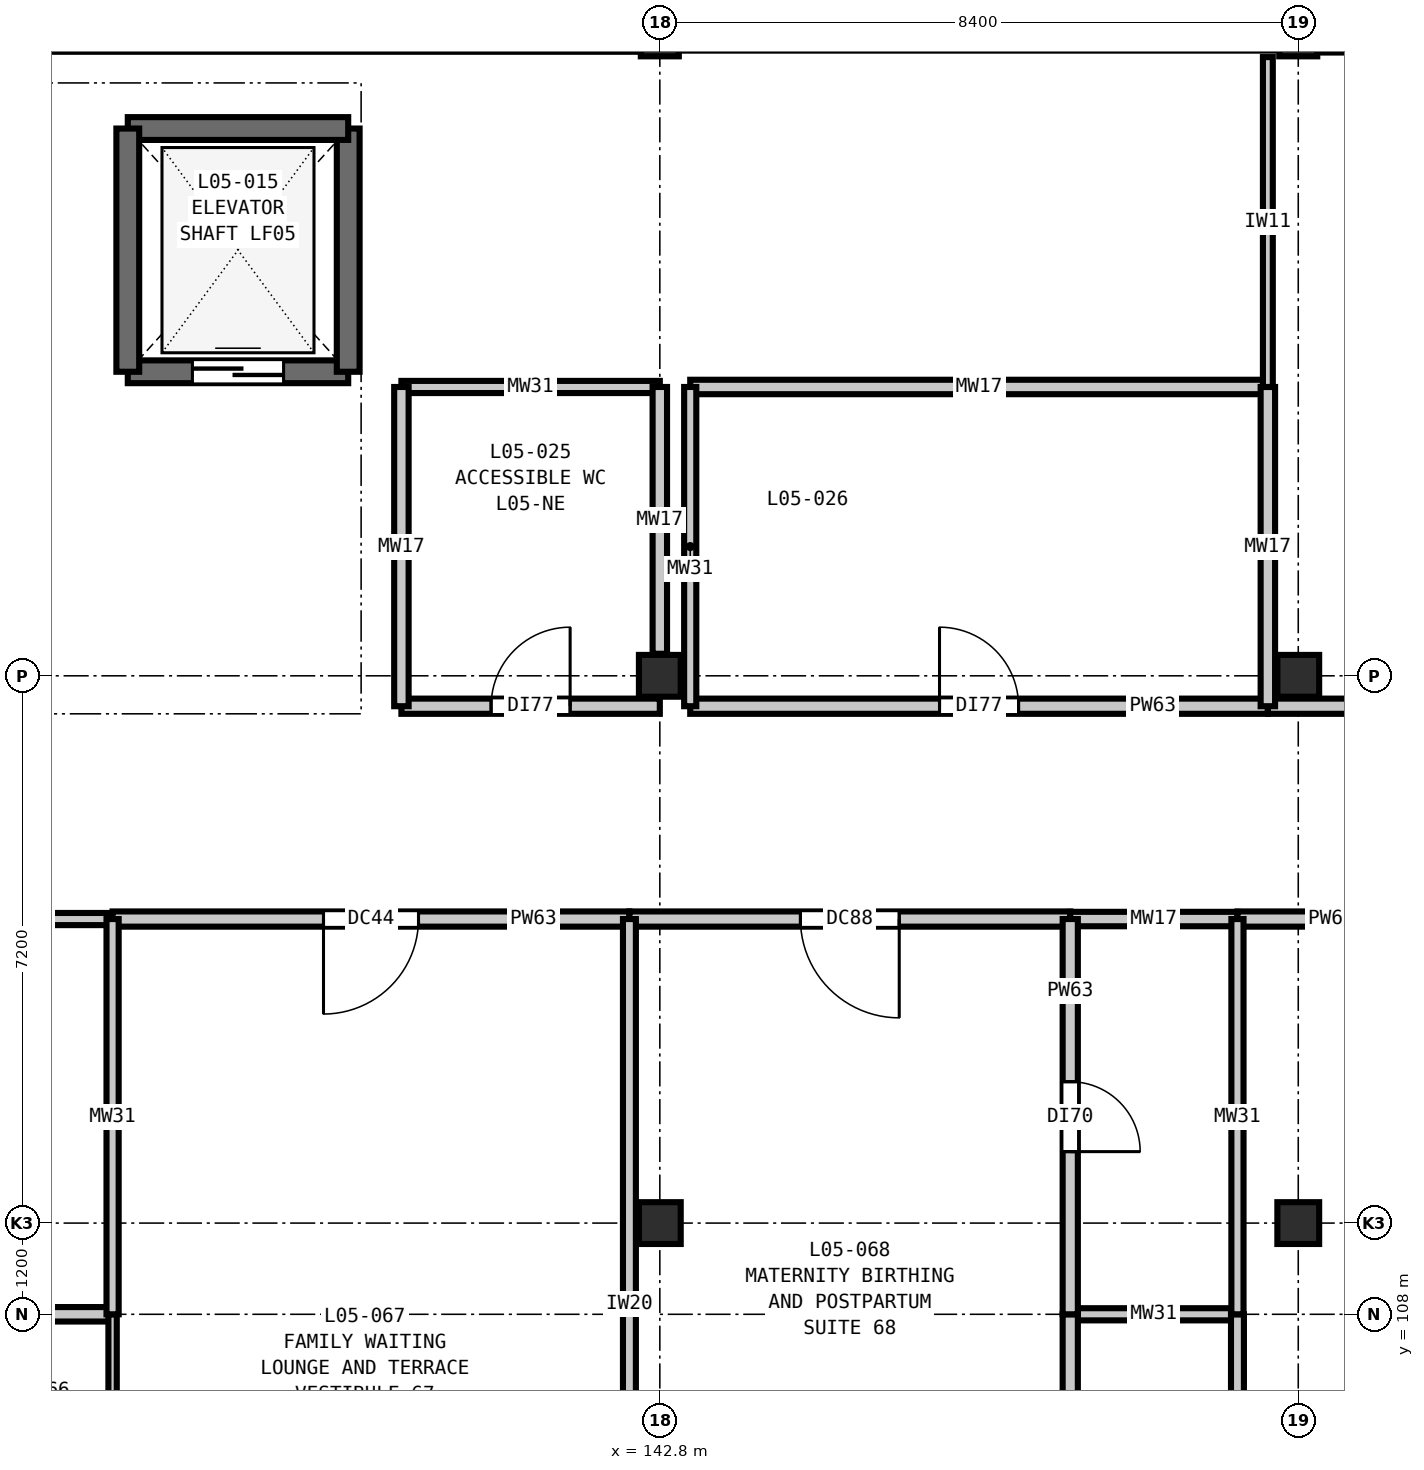
"""IFC4 building model, lengths in metres.
Left out: names, types, materials, properties, quantities, classifications, styles, units other than length and angle.
Written with IfcOpenShell. Run it as: python <this file> out.ifc"""

import sys

from ifc_helpers import new_model, si_unit, direction, frame, frame_2d, origin, origin_2d, place, context, subcontext, project, spatial, rectangle, extrude, element, fill, save


model = new_model("IFC4")
c1 = context("Model", 3, precision=1e-05, world=origin(), true_north=direction((0.0, 1.0)))
c2 = subcontext(c1, "Body", "Model", "MODEL_VIEW")
j1 = project(units=[si_unit("LENGTHUNIT", "METRE"), si_unit("PLANEANGLEUNIT", "RADIAN")], contexts=[c1])
p1 = place(None, origin())
s1 = spatial("IfcSite", under=j1, at=p1, CompositionType="ELEMENT")
p2 = place(p1, origin())
s2 = spatial("IfcBuilding", under=s1, at=p2, CompositionType="ELEMENT")
p3 = place(p2, frame((0.0, 0.0, 24.6)))
s3 = spatial("IfcBuildingStorey", under=s2, at=p3, CompositionType="ELEMENT", Elevation=24.6)
for number, where, z_axis, x_axis in (
    (1, (142.8, 109.2, 0.0), (0.0, 0.0, 1.0), (1.0, 0.0, 0.0)),
    (2, (142.8, 116.4, 0.0), (0.0, 0.0, 1.0), (1.0, 0.0, 0.0)),
):
    element("IfcColumn", number, at=place(p3, frame(where, z_axis=z_axis, x_axis=x_axis)), inside=s3, PredefinedType="COLUMN", context=c2, shape_type="SweptSolid", body=[
        extrude(rectangle(XDim=0.55, YDim=0.55, at=origin_2d()), origin(), (0.0, 0.0, 1.0), 4.2),
    ])
p4 = place(p3, frame((142.8, 124.8, 0.0), z_axis=(0.0, 0.0, 1.0), x_axis=(1.0, 0.0, 0.0)))
e3 = element("IfcColumn", 3, at=p4, inside=s3, PredefinedType="COLUMN", context=c2, shape_type="SweptSolid", body=[
    extrude(rectangle(XDim=0.5, YDim=0.5, at=origin_2d()), origin(), (0.0, 0.0, 1.0), 4.2),
])
for number, where, z_axis, x_axis in (
    (4, (151.2, 109.2, 0.0), (0.0, 0.0, 1.0), (1.0, 0.0, 0.0)),
    (5, (151.2, 116.4, 0.0), (0.0, 0.0, 1.0), (1.0, 0.0, 0.0)),
):
    element("IfcColumn", number, at=place(p3, frame(where, z_axis=z_axis, x_axis=x_axis)), inside=s3, PredefinedType="COLUMN", context=c2, shape_type="SweptSolid", body=[
        extrude(rectangle(XDim=0.55, YDim=0.55, at=origin_2d()), origin(), (0.0, 0.0, 1.0), 4.2),
    ])
p5 = place(p3, frame((151.2, 124.8, 0.0), z_axis=(0.0, 0.0, 1.0), x_axis=(1.0, 0.0, 0.0)))
e6 = element("IfcColumn", 6, at=p5, inside=s3, PredefinedType="COLUMN", context=c2, shape_type="SweptSolid", body=[
    extrude(rectangle(XDim=0.5, YDim=0.5, at=origin_2d()), origin(), (0.0, 0.0, 1.0), 4.2),
])
p6 = place(p3, frame((135.8, 120.4, 0.0), z_axis=(0.0, 0.0, 1.0), x_axis=(1.0, 0.0, 0.0)))
e7 = element("IfcWall", 7, at=p6, inside=s3, PredefinedType="SHEAR", context=c2, shape_type="SweptSolid", body=[
    extrude(rectangle(XDim=2.9, YDim=0.3, at=frame_2d((1.45, 0.0))), origin(), (0.0, 0.0, 1.0), 4.2),
])
p7 = place(p6, frame((0.85, 0.0, 0.0)))
e8 = element("IfcOpeningElement", 8, at=p7, cuts=e7, PredefinedType="OPENING", context=c2, shape_type="SweptSolid", body=[
    extrude(rectangle(XDim=1.2, YDim=2.2, at=frame_2d((0.6, 1.1))), frame((0.0, 0.16, 0.0), z_axis=(0.0, -1.0, 0.0), x_axis=(1.0, 0.0, 0.0)), (0.0, 0.0, 1.0), 0.32),
])
p8 = place(p3, frame((138.7, 120.4, 0.0), z_axis=(0.0, 0.0, 1.0), x_axis=(0.0, 1.0, 0.0)))
e9 = element("IfcWall", 9, at=p8, inside=s3, PredefinedType="SHEAR", context=c2, shape_type="SweptSolid", body=[
    extrude(rectangle(XDim=3.2, YDim=0.3, at=frame_2d((1.6, 0.0))), origin(), (0.0, 0.0, 1.0), 4.2),
])
p9 = place(p3, frame((138.7, 123.6, 0.0), z_axis=(0.0, 0.0, 1.0), x_axis=(-1.0, 0.0, 0.0)))
e10 = element("IfcWall", 10, at=p9, inside=s3, PredefinedType="SHEAR", context=c2, shape_type="SweptSolid", body=[
    extrude(rectangle(XDim=2.9, YDim=0.3, at=frame_2d((1.45, 0.0))), origin(), (0.0, 0.0, 1.0), 4.2),
])
p10 = place(p3, frame((135.8, 123.6, 0.0), z_axis=(0.0, 0.0, 1.0), x_axis=(0.0, -1.0, 0.0)))
e11 = element("IfcWall", 11, at=p10, inside=s3, PredefinedType="SHEAR", context=c2, shape_type="SweptSolid", body=[
    extrude(rectangle(XDim=3.2, YDim=0.3, at=frame_2d((1.6, 0.0))), origin(), (0.0, 0.0, 1.0), 4.2),
])
p11 = place(p3, frame((133.4, 108.0, 0.0), z_axis=(0.0, 0.0, 1.0), x_axis=(1.0, 0.0, 0.0)))
e12 = element("IfcWall", 12, at=p11, inside=s3, PredefinedType="PLUMBINGWALL", context=c2, shape_type="SweptSolid", body=[
    extrude(rectangle(XDim=2.2, YDim=0.19, at=frame_2d((1.1, 0.0))), origin(), (0.0, 0.0, 1.0), 3.92),
])
p12 = place(p3, frame((148.2, 108.0, 0.0), z_axis=(0.0, 0.0, 1.0), x_axis=(1.0, 0.0, 0.0)))
e13 = element("IfcWall", 13, at=p12, inside=s3, PredefinedType="PLUMBINGWALL", context=c2, shape_type="SweptSolid", body=[
    extrude(rectangle(XDim=2.2, YDim=0.16, at=frame_2d((1.1, 0.0))), origin(), (0.0, 0.0, 1.0), 3.92),
])
p13 = place(p3, frame((133.4, 113.2, 0.0), z_axis=(0.0, 0.0, 1.0), x_axis=(1.0, 0.0, 0.0)))
e14 = element("IfcWall", 14, at=p13, inside=s3, PredefinedType="PLUMBINGWALL", context=c2, shape_type="SweptSolid", body=[
    extrude(rectangle(XDim=2.2, YDim=0.16, at=frame_2d((1.1, 0.0))), origin(), (0.0, 0.0, 1.0), 3.92),
])
p14 = place(p3, frame((135.6, 113.2, 0.0), z_axis=(0.0, 0.0, 1.0), x_axis=(1.0, 0.0, 0.0)))
e15 = element("IfcWall", 15, at=p14, inside=s3, PredefinedType="PARTITIONING", context=c2, shape_type="SweptSolid", body=[
    extrude(rectangle(XDim=6.8, YDim=0.2, at=frame_2d((3.4, 0.0))), origin(), (0.0, 0.0, 1.0), 3.92),
])
p15 = place(p14, frame((2.775, 0.0, 0.0)))
e16 = element("IfcOpeningElement", 16, at=p15, cuts=e15, PredefinedType="OPENING", context=c2, shape_type="SweptSolid", body=[
    extrude(rectangle(XDim=1.25, YDim=2.15, at=frame_2d((0.625, 1.075))), frame((0.0, 0.11, 0.0), z_axis=(0.0, -1.0, 0.0), x_axis=(1.0, 0.0, 0.0)), (0.0, 0.0, 1.0), 0.22),
])
p16 = place(p3, frame((142.4, 113.2, 0.0), z_axis=(0.0, 0.0, 1.0), x_axis=(1.0, 0.0, 0.0)))
e17 = element("IfcWall", 17, at=p16, inside=s3, PredefinedType="PARTITIONING", context=c2, shape_type="SweptSolid", body=[
    extrude(rectangle(XDim=5.8, YDim=0.2, at=frame_2d((2.9, 0.0))), origin(), (0.0, 0.0, 1.0), 3.92),
])
p17 = place(p16, frame((2.25, 0.0, 0.0)))
e18 = element("IfcOpeningElement", 18, at=p17, cuts=e17, PredefinedType="OPENING", context=c2, shape_type="SweptSolid", body=[
    extrude(rectangle(XDim=1.3, YDim=2.2, at=frame_2d((0.65, 1.1))), frame((0.0, 0.11, 0.0), z_axis=(0.0, -1.0, 0.0), x_axis=(1.0, 0.0, 0.0)), (0.0, 0.0, 1.0), 0.22),
])
p18 = place(p3, frame((148.2, 113.2, 0.0), z_axis=(0.0, 0.0, 1.0), x_axis=(1.0, 0.0, 0.0)))
e19 = element("IfcWall", 19, at=p18, inside=s3, PredefinedType="PLUMBINGWALL", context=c2, shape_type="SweptSolid", body=[
    extrude(rectangle(XDim=2.2, YDim=0.19, at=frame_2d((1.1, 0.0))), origin(), (0.0, 0.0, 1.0), 3.92),
])
p19 = place(p3, frame((150.4, 113.2, 0.0), z_axis=(0.0, 0.0, 1.0), x_axis=(1.0, 0.0, 0.0)))
e20 = element("IfcWall", 20, at=p19, inside=s3, PredefinedType="PARTITIONING", context=c2, shape_type="SweptSolid", body=[
    extrude(rectangle(XDim=6.8, YDim=0.2, at=frame_2d((3.4, 0.0))), origin(), (0.0, 0.0, 1.0), 3.92),
])
p20 = place(p19, frame((2.725, 0.0, 0.0)))
e21 = element("IfcOpeningElement", 21, at=p20, cuts=e20, PredefinedType="OPENING", context=c2, shape_type="SweptSolid", body=[
    extrude(rectangle(XDim=1.35, YDim=2.2, at=frame_2d((0.675, 1.1))), frame((0.0, 0.11, 0.0), z_axis=(0.0, -1.0, 0.0), x_axis=(1.0, 0.0, 0.0)), (0.0, 0.0, 1.0), 0.22),
])
p21 = place(p3, frame((139.4, 116.0, 0.0), z_axis=(0.0, 0.0, 1.0), x_axis=(1.0, 0.0, 0.0)))
e22 = element("IfcWall", 22, at=p21, inside=s3, PredefinedType="PARTITIONING", context=c2, shape_type="SweptSolid", body=[
    extrude(rectangle(XDim=3.4, YDim=0.2, at=frame_2d((1.7, 0.0))), origin(), (0.0, 0.0, 1.0), 3.92),
])
p22 = place(p21, frame((1.18, 0.0, 0.0)))
e23 = element("IfcOpeningElement", 23, at=p22, cuts=e22, PredefinedType="OPENING", context=c2, shape_type="SweptSolid", body=[
    extrude(rectangle(XDim=1.04, YDim=2.1, at=frame_2d((0.52, 1.05))), frame((0.0, 0.11, 0.0), z_axis=(0.0, -1.0, 0.0), x_axis=(1.0, 0.0, 0.0)), (0.0, 0.0, 1.0), 0.22),
])
p23 = place(p3, frame((143.2, 116.0, 0.0), z_axis=(0.0, 0.0, 1.0), x_axis=(1.0, 0.0, 0.0)))
e24 = element("IfcWall", 24, at=p23, inside=s3, PredefinedType="PARTITIONING", context=c2, shape_type="SweptSolid", body=[
    extrude(rectangle(XDim=7.6, YDim=0.2, at=frame_2d((3.8, 0.0))), origin(), (0.0, 0.0, 1.0), 3.92),
])
p24 = place(p23, frame((3.28, 0.0, 0.0)))
e25 = element("IfcOpeningElement", 25, at=p24, cuts=e24, PredefinedType="OPENING", context=c2, shape_type="SweptSolid", body=[
    extrude(rectangle(XDim=1.04, YDim=2.1, at=frame_2d((0.52, 1.05))), frame((0.0, 0.11, 0.0), z_axis=(0.0, -1.0, 0.0), x_axis=(1.0, 0.0, 0.0)), (0.0, 0.0, 1.0), 0.22),
])
p25 = place(p3, frame((150.8, 116.0, 0.0), z_axis=(0.0, 0.0, 1.0), x_axis=(1.0, 0.0, 0.0)))
e26 = element("IfcWall", 26, at=p25, inside=s3, PredefinedType="PARTITIONING", context=c2, shape_type="SweptSolid", body=[
    extrude(rectangle(XDim=6.8, YDim=0.2, at=frame_2d((3.4, 0.0))), origin(), (0.0, 0.0, 1.0), 3.92),
])
p26 = place(p25, frame((2.55, 0.0, 0.0)))
e27 = element("IfcOpeningElement", 27, at=p26, cuts=e26, PredefinedType="OPENING", context=c2, shape_type="SweptSolid", body=[
    extrude(rectangle(XDim=1.7, YDim=2.3, at=frame_2d((0.85, 1.15))), frame((0.0, 0.11, 0.0), z_axis=(0.0, -1.0, 0.0), x_axis=(1.0, 0.0, 0.0)), (0.0, 0.0, 1.0), 0.22),
])
p27 = place(p3, frame((139.4, 120.2, 0.0), z_axis=(0.0, 0.0, 1.0), x_axis=(1.0, 0.0, 0.0)))
e28 = element("IfcWall", 28, at=p27, inside=s3, PredefinedType="PLUMBINGWALL", context=c2, shape_type="SweptSolid", body=[
    extrude(rectangle(XDim=3.4, YDim=0.16, at=frame_2d((1.7, 0.0))), origin(), (0.0, 0.0, 1.0), 3.92),
])
p28 = place(p3, frame((143.2, 120.2, 0.0), z_axis=(0.0, 0.0, 1.0), x_axis=(1.0, 0.0, 0.0)))
e29 = element("IfcWall", 29, at=p28, inside=s3, PredefinedType="PLUMBINGWALL", context=c2, shape_type="SweptSolid", body=[
    extrude(rectangle(XDim=7.6, YDim=0.19, at=frame_2d((3.8, 0.0))), origin(), (0.0, 0.0, 1.0), 3.92),
])
p29 = place(p3, frame((135.6, 103.06, 0.0), z_axis=(0.0, 0.0, 1.0), x_axis=(0.0, 1.0, 0.0)))
e30 = element("IfcWall", 30, at=p29, inside=s3, PredefinedType="PARTITIONING", context=c2, shape_type="SweptSolid", body=[
    extrude(rectangle(XDim=4.94, YDim=0.11, at=frame_2d((2.47, 0.0))), origin(), (0.0, 0.0, 1.0), 3.92),
])
p30 = place(p3, frame((135.6, 108.0, 0.0), z_axis=(0.0, 0.0, 1.0), x_axis=(0.0, 1.0, 0.0)))
e31 = element("IfcWall", 31, at=p30, inside=s3, PredefinedType="PLUMBINGWALL", context=c2, shape_type="SweptSolid", body=[
    extrude(rectangle(XDim=5.2, YDim=0.16, at=frame_2d((2.6, 0.0))), origin(), (0.0, 0.0, 1.0), 3.92),
])
p31 = place(p3, frame((139.4, 116.0, 0.0), z_axis=(0.0, 0.0, 1.0), x_axis=(0.0, 1.0, 0.0)))
e32 = element("IfcWall", 32, at=p31, inside=s3, PredefinedType="PLUMBINGWALL", context=c2, shape_type="SweptSolid", body=[
    extrude(rectangle(XDim=4.2, YDim=0.19, at=frame_2d((2.1, 0.0))), origin(), (0.0, 0.0, 1.0), 3.92),
])
p32 = place(p3, frame((142.4, 103.06, 0.0), z_axis=(0.0, 0.0, 1.0), x_axis=(0.0, 1.0, 0.0)))
e33 = element("IfcWall", 33, at=p32, inside=s3, PredefinedType="PARTITIONING", context=c2, shape_type="SweptSolid", body=[
    extrude(rectangle(XDim=10.14, YDim=0.17, at=frame_2d((5.07, 0.0))), origin(), (0.0, 0.0, 1.0), 3.92),
])
p33 = place(p3, frame((142.8, 116.69, 0.0), z_axis=(0.0, 0.0, 1.0), x_axis=(0.0, 1.0, 0.0)))
e34 = element("IfcWall", 34, at=p33, inside=s3, PredefinedType="PLUMBINGWALL", context=c2, shape_type="SweptSolid", body=[
    extrude(rectangle(XDim=3.51, YDim=0.19, at=frame_2d((1.755, 0.0))), origin(), (0.0, 0.0, 1.0), 3.635),
])
p34 = place(p3, frame((143.2, 116.0, 0.0), z_axis=(0.0, 0.0, 1.0), x_axis=(0.0, 1.0, 0.0)))
e35 = element("IfcWall", 35, at=p34, inside=s3, PredefinedType="PLUMBINGWALL", context=c2, shape_type="SweptSolid", body=[
    extrude(rectangle(XDim=4.2, YDim=0.16, at=frame_2d((2.1, 0.0))), origin(), (0.0, 0.0, 1.0), 3.92),
])
p35 = place(p3, frame((148.2, 103.06, 0.0), z_axis=(0.0, 0.0, 1.0), x_axis=(0.0, 1.0, 0.0)))
e36 = element("IfcWall", 36, at=p35, inside=s3, PredefinedType="PARTITIONING", context=c2, shape_type="SweptSolid", body=[
    extrude(rectangle(XDim=4.94, YDim=0.2, at=frame_2d((2.47, 0.0))), origin(), (0.0, 0.0, 1.0), 3.92),
])
p36 = place(p35, frame((1.545, 0.0, 0.0)))
e37 = element("IfcOpeningElement", 37, at=p36, cuts=e36, PredefinedType="OPENING", context=c2, shape_type="SweptSolid", body=[
    extrude(rectangle(XDim=1.85, YDim=2.3, at=frame_2d((0.925, 1.15))), frame((0.0, 0.11, 0.0), z_axis=(0.0, -1.0, 0.0), x_axis=(1.0, 0.0, 0.0)), (0.0, 0.0, 1.0), 0.22),
])
p37 = place(p3, frame((148.2, 108.0, 0.0), z_axis=(0.0, 0.0, 1.0), x_axis=(0.0, 1.0, 0.0)))
e38 = element("IfcWall", 38, at=p37, inside=s3, PredefinedType="PARTITIONING", context=c2, shape_type="SweptSolid", body=[
    extrude(rectangle(XDim=5.2, YDim=0.2, at=frame_2d((2.6, 0.0))), origin(), (0.0, 0.0, 1.0), 3.92),
])
p38 = place(p37, frame((2.14, 0.0, 0.0)))
e39 = element("IfcOpeningElement", 39, at=p38, cuts=e38, PredefinedType="OPENING", context=c2, shape_type="SweptSolid", body=[
    extrude(rectangle(XDim=0.92, YDim=2.1, at=frame_2d((0.46, 1.05))), frame((0.0, 0.11, 0.0), z_axis=(0.0, -1.0, 0.0), x_axis=(1.0, 0.0, 0.0)), (0.0, 0.0, 1.0), 0.22),
])
p39 = place(p3, frame((150.4, 103.06, 0.0), z_axis=(0.0, 0.0, 1.0), x_axis=(0.0, 1.0, 0.0)))
e40 = element("IfcWall", 40, at=p39, inside=s3, PredefinedType="PARTITIONING", context=c2, shape_type="SweptSolid", body=[
    extrude(rectangle(XDim=4.94, YDim=0.17, at=frame_2d((2.47, 0.0))), origin(), (0.0, 0.0, 1.0), 3.92),
])
p40 = place(p3, frame((150.4, 108.0, 0.0), z_axis=(0.0, 0.0, 1.0), x_axis=(0.0, 1.0, 0.0)))
e41 = element("IfcWall", 41, at=p40, inside=s3, PredefinedType="PLUMBINGWALL", context=c2, shape_type="SweptSolid", body=[
    extrude(rectangle(XDim=5.2, YDim=0.16, at=frame_2d((2.6, 0.0))), origin(), (0.0, 0.0, 1.0), 3.92),
])
p41 = place(p3, frame((150.8, 116.0, 0.0), z_axis=(0.0, 0.0, 1.0), x_axis=(0.0, 1.0, 0.0)))
e42 = element("IfcWall", 42, at=p41, inside=s3, PredefinedType="PLUMBINGWALL", context=c2, shape_type="SweptSolid", body=[
    extrude(rectangle(XDim=4.2, YDim=0.19, at=frame_2d((2.1, 0.0))), origin(), (0.0, 0.0, 1.0), 3.92),
])
p42 = place(p3, frame((150.8, 120.2, 0.0), z_axis=(0.0, 0.0, 1.0), x_axis=(0.0, 1.0, 0.0)))
e43 = element("IfcWall", 43, at=p42, inside=s3, PredefinedType="PARTITIONING", context=c2, shape_type="SweptSolid", body=[
    extrude(rectangle(XDim=4.34, YDim=0.13, at=frame_2d((2.17, 0.0))), origin(), (0.0, 0.0, 1.0), 3.92),
])
p43 = place(p7, origin())
e44 = element("IfcDoor", 44, at=p43, inside=s3, OperationType="DOUBLE_DOOR_SLIDING", PredefinedType="DOOR", context=c2, shape_type="SweptSolid", body=[
    extrude(rectangle(XDim=1.2, YDim=2.2, at=frame_2d((0.6, 1.1))), frame((0.0, 0.025, 0.0), z_axis=(0.0, -1.0, 0.0), x_axis=(1.0, 0.0, 0.0)), (0.0, 0.0, 1.0), 0.05),
])
fill(e8, e44)
p44 = place(p15, frame((1.25, 0.0, 0.0), z_axis=(0.0, 0.0, 1.0), x_axis=(-1.0, 0.0, 0.0)))
e45 = element("IfcDoor", 45, at=p44, inside=s3, OperationType="SINGLE_SWING_RIGHT", PredefinedType="DOOR", context=c2, shape_type="SweptSolid", body=[
    extrude(rectangle(XDim=1.25, YDim=2.15, at=frame_2d((0.625, 1.075))), frame((0.0, 0.025, 0.0), z_axis=(0.0, -1.0, 0.0), x_axis=(1.0, 0.0, 0.0)), (0.0, 0.0, 1.0), 0.05),
])
fill(e16, e45)
p45 = place(p17, frame((1.3, 0.0, 0.0), z_axis=(0.0, 0.0, 1.0), x_axis=(-1.0, 0.0, 0.0)))
e46 = element("IfcDoor", 46, at=p45, inside=s3, OperationType="SINGLE_SWING_LEFT", PredefinedType="DOOR", context=c2, shape_type="SweptSolid", body=[
    extrude(rectangle(XDim=1.3, YDim=2.2, at=frame_2d((0.65, 1.1))), frame((0.0, 0.025, 0.0), z_axis=(0.0, -1.0, 0.0), x_axis=(1.0, 0.0, 0.0)), (0.0, 0.0, 1.0), 0.05),
])
fill(e18, e46)
p46 = place(p22, origin())
e47 = element("IfcDoor", 47, at=p46, inside=s3, OperationType="SINGLE_SWING_RIGHT", PredefinedType="DOOR", context=c2, shape_type="SweptSolid", body=[
    extrude(rectangle(XDim=1.04, YDim=2.1, at=frame_2d((0.52, 1.05))), frame((0.0, 0.025, 0.0), z_axis=(0.0, -1.0, 0.0), x_axis=(1.0, 0.0, 0.0)), (0.0, 0.0, 1.0), 0.05),
])
fill(e23, e47)
p47 = place(p24, origin())
e48 = element("IfcDoor", 48, at=p47, inside=s3, OperationType="SINGLE_SWING_LEFT", PredefinedType="DOOR", context=c2, shape_type="SweptSolid", body=[
    extrude(rectangle(XDim=1.04, YDim=2.1, at=frame_2d((0.52, 1.05))), frame((0.0, 0.025, 0.0), z_axis=(0.0, -1.0, 0.0), x_axis=(1.0, 0.0, 0.0)), (0.0, 0.0, 1.0), 0.05),
])
fill(e25, e48)
p48 = place(p38, frame((0.92, 0.0, 0.0), z_axis=(0.0, 0.0, 1.0), x_axis=(-1.0, 0.0, 0.0)))
e49 = element("IfcDoor", 49, at=p48, inside=s3, OperationType="SINGLE_SWING_RIGHT", PredefinedType="DOOR", context=c2, shape_type="SweptSolid", body=[
    extrude(rectangle(XDim=0.92, YDim=2.1, at=frame_2d((0.46, 1.05))), frame((0.0, 0.025, 0.0), z_axis=(0.0, -1.0, 0.0), x_axis=(1.0, 0.0, 0.0)), (0.0, 0.0, 1.0), 0.05),
])
fill(e39, e49)
save(model, sys.argv[1])
